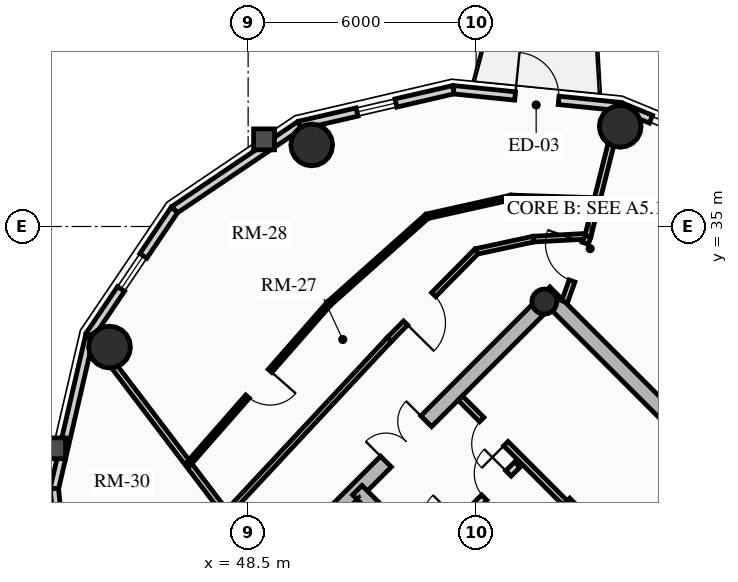
"""IFC4 building model, lengths in metres.
Left out: names, types, materials, properties, quantities, classifications, styles, units other than length and angle.
Written with IfcOpenShell. Run it as: python <this file> out.ifc"""

import sys

from ifc_helpers import new_model, si_unit, direction, frame, frame_2d, origin, origin_2d, place, context, subcontext, project, spatial, rectangle, circle, hollow_circle, extrude, source, transform, mapped, element, fill, save


model = new_model("IFC4")
c1 = context("Model", 3, precision=1e-05, world=origin(), true_north=direction((0.0, 1.0)))
c2 = subcontext(c1, "Body", "Model", "MODEL_VIEW")
j1 = project(units=[si_unit("LENGTHUNIT", "METRE"), si_unit("PLANEANGLEUNIT", "RADIAN")], contexts=[c1])
p1 = place(None, origin())
s1 = spatial("IfcSite", under=j1, at=p1, CompositionType="ELEMENT")
p2 = place(p1, origin())
s2 = spatial("IfcBuilding", under=s1, at=p2, CompositionType="ELEMENT")
p3 = place(p2, frame((0.0, 0.0, 217.03)))
s3 = spatial("IfcBuildingStorey", under=s2, at=p3, CompositionType="ELEMENT", Elevation=217.03)
p4 = place(p3, frame((66.268, 23.298, 0.0), z_axis=(0.0, 0.0, 1.0), x_axis=(-0.707106781187, 0.707106781187, 0.0)))
e1 = element("IfcWall", 1, at=p4, inside=s3, PredefinedType="SHEAR", context=c2, shape_type="SweptSolid", body=[
    extrude(rectangle(XDim=14.1, YDim=0.4, at=frame_2d((7.05, 0.0))), origin(), (0.0, 0.0, 1.0), 2.91),
])
p5 = place(p3, frame((48.873, 25.561, 0.0), z_axis=(0.0, 0.0, 1.0), x_axis=(0.707106781187, 0.707106781187, 0.0)))
e2 = element("IfcWall", 2, at=p5, inside=s3, PredefinedType="SHEAR", context=c2, shape_type="SweptSolid", body=[
    extrude(rectangle(XDim=10.7, YDim=0.4, at=frame_2d((5.35, 0.0))), origin(), (0.0, 0.0, 1.0), 2.91),
])
m1 = source(origin(), c2, "Body", "SweptSolid", [
    extrude(rectangle(XDim=1.5, YDim=2.02, at=frame_2d((0.75, 1.01))), frame((0.0, 0.21, 0.0), z_axis=(0.0, -1.0, 0.0), x_axis=(1.0, 0.0, 0.0)), (0.0, 0.0, 1.0), 0.42),
])
p6 = place(p5, frame((4.6, 0.0, 0.0)))
e3 = element("IfcOpeningElement", 3, at=p6, cuts=e2, PredefinedType="OPENING", context=c2, shape_type="MappedRepresentation", body=[
    mapped(m1, transform((0.0, 0.0, 0.0), x_axis=(1.0, 0.0, 0.0), y_axis=(0.0, 1.0, 0.0), z_axis=(0.0, 0.0, 1.0), scale=1.0)),
])
p7 = place(p3, frame((61.06, 18.373, 0.0), z_axis=(0.0, 0.0, 1.0), x_axis=(-0.707106781187, 0.707106781187, 0.0)))
e4 = element("IfcWall", 4, at=p7, inside=s3, PredefinedType="SHEAR", context=c2, shape_type="SweptSolid", body=[
    extrude(rectangle(XDim=13.7, YDim=0.35, at=frame_2d((6.85, 0.0))), origin(), (0.0, 0.0, 1.0), 2.91),
])
m2 = source(origin(), c2, "Body", "SweptSolid", [
    extrude(rectangle(XDim=1.1, YDim=2.015, at=frame_2d((0.55, 1.007))), frame((0.0, 0.185, 0.0), z_axis=(0.0, -1.0, 0.0), x_axis=(1.0, 0.0, 0.0)), (0.0, 0.0, 1.0), 0.37),
])
p8 = place(p7, frame((4.85, 0.0, 0.0)))
e5 = element("IfcOpeningElement", 5, at=p8, cuts=e4, PredefinedType="OPENING", context=c2, shape_type="MappedRepresentation", body=[
    mapped(m2, transform((0.0, 0.0, 0.0), x_axis=(1.0, 0.0, 0.0), y_axis=(0.0, 1.0, 0.0), z_axis=(0.0, 0.0, 1.0), scale=1.0)),
])
p9 = place(p7, frame((0.625, 0.0, 0.0)))
e6 = element("IfcOpeningElement", 6, at=p9, cuts=e4, PredefinedType="OPENING", context=c2, shape_type="MappedRepresentation", body=[
    mapped(m2, transform((0.0, 0.0, 0.0), x_axis=(1.0, 0.0, 0.0), y_axis=(0.0, 1.0, 0.0), z_axis=(0.0, 0.0, 1.0), scale=1.0)),
])
p10 = place(p7, frame((2.625, 0.0, 0.0)))
e7 = element("IfcOpeningElement", 7, at=p10, cuts=e4, PredefinedType="OPENING", context=c2, shape_type="MappedRepresentation", body=[
    mapped(m2, transform((0.0, 0.0, 0.0), x_axis=(1.0, 0.0, 0.0), y_axis=(0.0, 1.0, 0.0), z_axis=(0.0, 0.0, 1.0), scale=1.0)),
])
m3 = source(origin(), c2, "Body", "SweptSolid", [
    extrude(rectangle(XDim=1.15, YDim=2.02, at=frame_2d((0.575, 1.01))), frame((0.0, 0.185, 0.0), z_axis=(0.0, -1.0, 0.0), x_axis=(1.0, 0.0, 0.0)), (0.0, 0.0, 1.0), 0.37),
])
p11 = place(p7, frame((7.27, 0.0, 0.0)))
e8 = element("IfcOpeningElement", 8, at=p11, cuts=e4, PredefinedType="OPENING", context=c2, shape_type="MappedRepresentation", body=[
    mapped(m3, transform((0.0, 0.0, 0.0), x_axis=(1.0, 0.0, 0.0), y_axis=(0.0, 1.0, 0.0), z_axis=(0.0, 0.0, 1.0), scale=1.0)),
])
p12 = place(p3, frame((63.627, 20.94, 0.0), z_axis=(0.0, 0.0, 1.0), x_axis=(-0.707119496762, 0.707094065383, 0.0)))
e9 = element("IfcWall", 9, at=p12, inside=s3, PredefinedType="SHEAR", context=c2, shape_type="SweptSolid", body=[
    extrude(rectangle(XDim=9.6, YDim=0.35, at=frame_2d((4.8, 0.0))), origin(), (0.0, 0.0, 1.0), 2.91),
])
p13 = place(p12, frame((5.28, 0.0, 0.0)))
e10 = element("IfcOpeningElement", 10, at=p13, cuts=e9, PredefinedType="OPENING", context=c2, shape_type="MappedRepresentation", body=[
    mapped(m3, transform((0.0, 0.0, 0.0), x_axis=(1.0, 0.0, 0.0), y_axis=(0.0, 1.0, 0.0), z_axis=(0.0, 0.0, 1.0), scale=1.0)),
])
p14 = place(p3, frame((58.893, 25.674, 0.0), z_axis=(0.0, 0.0, 1.0), x_axis=(0.707106781187, 0.707106781187, 0.0)))
e11 = element("IfcWall", 11, at=p14, inside=s3, PredefinedType="SHEAR", context=c2, shape_type="SweptSolid", body=[
    extrude(rectangle(XDim=3.285, YDim=0.35, at=frame_2d((1.643, 0.0))), origin(), (0.0, 0.0, 1.0), 2.91),
])
p15 = place(p3, frame((56.294, 33.024, 0.0), z_axis=(0.0, 0.0, 1.0), x_axis=(0.707106781187, 0.707106781187, 0.0)))
e12 = element("IfcColumn", 12, at=p15, inside=s3, PredefinedType="COLUMN", context=c2, shape_type="SweptSolid", body=[
    extrude(hollow_circle(Radius=0.33, WallThickness=0.025, at=origin_2d()), origin(), (0.0, 0.0, 1.0), 2.91),
])
for number, where, z_axis, x_axis in (
    (13, (58.291, 37.635, 0.0), (0.0, 0.0, 1.0), (1.0, 0.0, 0.0)),
    (14, (50.173, 37.146, 0.0), (0.0, 0.0, 1.0), (1.0, 0.0, 0.0)),
    (15, (44.854, 31.827, 0.0), (0.0, 0.0, 1.0), (1.0, 0.0, 0.0)),
):
    element("IfcColumn", number, at=place(p3, frame(where, z_axis=z_axis, x_axis=x_axis)), inside=s3, PredefinedType="USERDEFINED", context=c2, shape_type="SweptSolid", body=[
        extrude(circle(Radius=0.55, at=origin_2d()), origin(), (0.0, 0.0, 1.0), 2.91),
    ])
p16 = place(p3, frame((58.295, 38.155, 0.0), z_axis=(0.0, 0.0, 1.0), x_axis=(0.924515260676, -0.381145028536, 0.0)))
e16 = element("IfcWall", 16, at=p16, inside=s3, PredefinedType="SOLIDWALL", context=c2, shape_type="SweptSolid", body=[
    extrude(rectangle(XDim=0.87, YDim=0.22, at=frame_2d((0.435, 0.0))), origin(), (0.0, 0.0, 1.0), 2.322),
])
p17 = place(p3, frame((53.9, 38.599, 0.0), z_axis=(0.0, 0.0, 1.0), x_axis=(0.994929930991, -0.100570534541, 0.0)))
e17 = element("IfcWall", 17, at=p17, inside=s3, PredefinedType="SOLIDWALL", context=c2, shape_type="SweptSolid", body=[
    extrude(rectangle(XDim=4.418, YDim=0.22, at=frame_2d((2.209, 0.0))), origin(), (0.0, 0.0, 1.0), 2.322),
])
m4 = source(origin(), c2, "Body", "SweptSolid", [
    extrude(rectangle(XDim=1.15, YDim=2.005, at=frame_2d((0.575, 1.002))), frame((0.0, 0.12, 0.0), z_axis=(0.0, -1.0, 0.0), x_axis=(1.0, 0.0, 0.0)), (0.0, 0.0, 1.0), 0.24),
])
p18 = place(p17, frame((1.634, 0.0, 0.0)))
e18 = element("IfcOpeningElement", 18, at=p18, cuts=e17, PredefinedType="OPENING", context=c2, shape_type="MappedRepresentation", body=[
    mapped(m4, transform((0.0, 0.0, 0.0), x_axis=(1.0, 0.0, 0.0), y_axis=(0.0, 1.0, 0.0), z_axis=(0.0, 0.0, 1.0), scale=1.0)),
])
p19 = place(p3, frame((49.856, 37.663, 0.0), z_axis=(0.0, 0.0, 1.0), x_axis=(0.974249228678, 0.225473813158, 0.0)))
e19 = element("IfcWall", 19, at=p19, inside=s3, PredefinedType="SOLIDWALL", context=c2, shape_type="SweptSolid", body=[
    extrude(rectangle(XDim=4.15, YDim=0.22, at=frame_2d((2.075, 0.0))), origin(), (0.0, 0.0, 1.0), 2.322),
])
m5 = source(origin(), c2, "Body", "SweptSolid", [
    extrude(rectangle(XDim=1.05, YDim=1.3, at=frame_2d((0.525, 0.65))), frame((0.0, 0.12, 0.0), z_axis=(0.0, -1.0, 0.0), x_axis=(1.0, 0.0, 0.0)), (0.0, 0.0, 1.0), 0.24),
])
p20 = place(p19, frame((1.55, 0.0, 0.65)))
e20 = element("IfcOpeningElement", 20, at=p20, cuts=e19, PredefinedType="OPENING", context=c2, shape_type="MappedRepresentation", body=[
    mapped(m5, transform((0.0, 0.0, 0.0), x_axis=(1.0, 0.0, 0.0), y_axis=(0.0, 1.0, 0.0), z_axis=(0.0, 0.0, 1.0), scale=1.0)),
])
p21 = place(p3, frame((46.561, 35.439, 0.0), z_axis=(0.0, 0.0, 1.0), x_axis=(0.828833723692, 0.559495003079, 0.0)))
e21 = element("IfcWall", 21, at=p21, inside=s3, PredefinedType="SOLIDWALL", context=c2, shape_type="SweptSolid", body=[
    extrude(rectangle(XDim=3.976, YDim=0.22, at=frame_2d((1.988, 0.0))), origin(), (0.0, 0.0, 1.0), 2.322),
])
p22 = place(p3, frame((44.337, 32.144, 0.0), z_axis=(0.0, 0.0, 1.0), x_axis=(0.559495003079, 0.828833723692, 0.0)))
e22 = element("IfcWall", 22, at=p22, inside=s3, PredefinedType="SOLIDWALL", context=c2, shape_type="SweptSolid", body=[
    extrude(rectangle(XDim=3.976, YDim=0.22, at=frame_2d((1.988, 0.0))), origin(), (0.0, 0.0, 1.0), 2.322),
])
p23 = place(p22, frame((1.463, 0.0, 0.65)))
e23 = element("IfcOpeningElement", 23, at=p23, cuts=e22, PredefinedType="OPENING", context=c2, shape_type="MappedRepresentation", body=[
    mapped(m5, transform((0.0, 0.0, 0.0), x_axis=(1.0, 0.0, 0.0), y_axis=(0.0, 1.0, 0.0), z_axis=(0.0, 0.0, 1.0), scale=1.0)),
])
p24 = place(p3, frame((43.401, 28.1, 0.0), z_axis=(0.0, 0.0, 1.0), x_axis=(0.225473813158, 0.974249228678, 0.0)))
e24 = element("IfcWall", 24, at=p24, inside=s3, PredefinedType="SOLIDWALL", context=c2, shape_type="SweptSolid", body=[
    extrude(rectangle(XDim=4.15, YDim=0.22, at=frame_2d((2.075, 0.0))), origin(), (0.0, 0.0, 1.0), 2.322),
])
p25 = place(p3, frame((43.845, 23.705, 0.0), z_axis=(0.0, 0.0, 1.0), x_axis=(-0.100570534541, 0.994929930991, 0.0)))
e25 = element("IfcWall", 25, at=p25, inside=s3, PredefinedType="SOLIDWALL", context=c2, shape_type="SweptSolid", body=[
    extrude(rectangle(XDim=4.418, YDim=0.22, at=frame_2d((2.209, 0.0))), origin(), (0.0, 0.0, 1.0), 2.322),
])
p26 = place(p25, frame((1.684, 0.0, 0.65)))
e26 = element("IfcOpeningElement", 26, at=p26, cuts=e25, PredefinedType="OPENING", context=c2, shape_type="MappedRepresentation", body=[
    mapped(m5, transform((0.0, 0.0, 0.0), x_axis=(1.0, 0.0, 0.0), y_axis=(0.0, 1.0, 0.0), z_axis=(0.0, 0.0, 1.0), scale=1.0)),
])
p27 = place(p3, frame((53.264, 26.416, 0.0), z_axis=(0.0, 0.0, 1.0), x_axis=(0.707106781187, 0.707106781187, 0.0)))
e27 = element("IfcWall", 27, at=p27, inside=s3, PredefinedType="PARTITIONING", context=c2, shape_type="SweptSolid", body=[
    extrude(rectangle(XDim=3.28, YDim=0.2, at=frame_2d((1.64, 0.0))), origin(), (0.0, 0.0, 1.0), 2.685),
])
m6 = source(origin(), c2, "Body", "SweptSolid", [
    extrude(rectangle(XDim=1.0, YDim=2.015, at=frame_2d((0.5, 1.007))), frame((0.0, 0.11, 0.0), z_axis=(0.0, -1.0, 0.0), x_axis=(1.0, 0.0, 0.0)), (0.0, 0.0, 1.0), 0.22),
])
p28 = place(p27, frame((0.14, 0.0, 0.0)))
e28 = element("IfcOpeningElement", 28, at=p28, cuts=e27, PredefinedType="OPENING", context=c2, shape_type="MappedRepresentation", body=[
    mapped(m6, transform((0.0, 0.0, 0.0), x_axis=(1.0, 0.0, 0.0), y_axis=(0.0, 1.0, 0.0), z_axis=(0.0, 0.0, 1.0), scale=1.0)),
])
m7 = source(origin(), c2, "Body", "SweptSolid", [
    extrude(rectangle(XDim=0.9, YDim=2.005, at=frame_2d((0.45, 1.002))), frame((0.0, 0.11, 0.0), z_axis=(0.0, -1.0, 0.0), x_axis=(1.0, 0.0, 0.0)), (0.0, 0.0, 1.0), 0.22),
])
p29 = place(p27, frame((2.05, 0.0, 0.0)))
e29 = element("IfcOpeningElement", 29, at=p29, cuts=e27, PredefinedType="OPENING", context=c2, shape_type="MappedRepresentation", body=[
    mapped(m7, transform((0.0, 0.0, 0.0), x_axis=(1.0, 0.0, 0.0), y_axis=(0.0, 1.0, 0.0), z_axis=(0.0, 0.0, 1.0), scale=1.0)),
])
p30 = place(p3, frame((56.839, 27.728, 0.0), z_axis=(0.0, 0.0, 1.0), x_axis=(-0.707106781187, 0.707106781187, 0.0)))
e30 = element("IfcWall", 30, at=p30, inside=s3, PredefinedType="PARTITIONING", context=c2, shape_type="SweptSolid", body=[
    extrude(rectangle(XDim=3.9, YDim=0.16, at=frame_2d((1.95, 0.0))), origin(), (0.0, 0.0, 1.0), 2.685),
])
m8 = source(origin(), c2, "Body", "SweptSolid", [
    extrude(rectangle(XDim=0.9, YDim=2.005, at=frame_2d((0.45, 1.002))), frame((0.0, 0.09, 0.0), z_axis=(0.0, -1.0, 0.0), x_axis=(1.0, 0.0, 0.0)), (0.0, 0.0, 1.0), 0.18),
])
p31 = place(p30, frame((2.2, 0.0, 0.0)))
e31 = element("IfcOpeningElement", 31, at=p31, cuts=e30, PredefinedType="OPENING", context=c2, shape_type="MappedRepresentation", body=[
    mapped(m8, transform((0.0, 0.0, 0.0), x_axis=(1.0, 0.0, 0.0), y_axis=(0.0, 1.0, 0.0), z_axis=(0.0, 0.0, 1.0), scale=1.0)),
])
p32 = place(p3, frame((57.44, 34.744, 0.0), z_axis=(0.0, 0.0, 1.0), x_axis=(-0.998578025565, -0.053309725738, 0.0)))
e32 = element("IfcWall", 32, at=p32, inside=s3, PredefinedType="PARTITIONING", context=c2, shape_type="SweptSolid", body=[
    extrude(rectangle(XDim=1.433, YDim=0.15, at=frame_2d((0.717, 0.0))), origin(), (0.0, 0.0, 1.0), 2.322),
])
p33 = place(p3, frame((56.009, 34.667, 0.0), z_axis=(0.0, 0.0, 1.0), x_axis=(-0.977625498152, -0.210353001795, 0.0)))
e33 = element("IfcWall", 33, at=p33, inside=s3, PredefinedType="PARTITIONING", context=c2, shape_type="SweptSolid", body=[
    extrude(rectangle(XDim=1.538, YDim=0.15, at=frame_2d((0.769, 0.0))), origin(), (0.0, 0.0, 1.0), 2.255),
])
p34 = place(p3, frame((54.506, 34.344, 0.0), z_axis=(0.0, 0.0, 1.0), x_axis=(-0.703053402247, -0.711137056824, 0.0)))
e34 = element("IfcWall", 34, at=p34, inside=s3, PredefinedType="PARTITIONING", context=c2, shape_type="SweptSolid", body=[
    extrude(rectangle(XDim=3.262, YDim=0.15, at=frame_2d((1.631, 0.0))), origin(), (0.0, 0.0, 1.0), 2.322),
])
m9 = source(origin(), c2, "Body", "SweptSolid", [
    extrude(rectangle(XDim=1.05, YDim=2.015, at=frame_2d((0.525, 1.007))), frame((0.0, 0.085, 0.0), z_axis=(0.0, -1.0, 0.0), x_axis=(1.0, 0.0, 0.0)), (0.0, 0.0, 1.0), 0.17),
])
p35 = place(p34, frame((1.599, 0.0, 0.0)))
e35 = element("IfcOpeningElement", 35, at=p35, cuts=e34, PredefinedType="OPENING", context=c2, shape_type="MappedRepresentation", body=[
    mapped(m9, transform((0.0, 0.0, 0.0), x_axis=(1.0, 0.0, 0.0), y_axis=(0.0, 1.0, 0.0), z_axis=(0.0, 0.0, 1.0), scale=1.0)),
])
p36 = place(p3, frame((52.212, 32.024, 0.0), z_axis=(0.0, 0.0, 1.0), x_axis=(-0.682158998173, -0.731203871169, 0.0)))
e36 = element("IfcWall", 36, at=p36, inside=s3, PredefinedType="PARTITIONING", context=c2, shape_type="SweptSolid", body=[
    extrude(rectangle(XDim=6.282, YDim=0.15, at=frame_2d((3.141, 0.0))), origin(), (0.0, 0.0, 1.0), 2.255),
])
p37 = place(p3, frame((57.44, 34.744, 0.0), z_axis=(0.0, 0.0, 1.0), x_axis=(0.243619816457, 0.969870808422, 0.0)))
e37 = element("IfcWall", 37, at=p37, inside=s3, PredefinedType="PARTITIONING", context=c2, shape_type="SweptSolid", body=[
    extrude(rectangle(XDim=3.496, YDim=0.16, at=frame_2d((1.748, 0.0))), origin(), (0.0, 0.0, 1.0), 2.322),
])
p38 = place(p3, frame((47.927, 27.431, 0.0), z_axis=(0.0, 0.0, 1.0), x_axis=(-0.604823333103, 0.796359677366, 0.0)))
e38 = element("IfcWall", 38, at=p38, inside=s3, PredefinedType="PARTITIONING", context=c2, shape_type="SweptSolid", body=[
    extrude(rectangle(XDim=5.907, YDim=0.16, at=frame_2d((2.953, 0.0))), origin(), (0.0, 0.0, 1.0), 2.322),
])
p39 = place(p3, frame((56.828, 33.021, 0.0), z_axis=(0.0, 0.0, 1.0), x_axis=(0.334788446034, 0.942293317605, 0.0)))
e39 = element("IfcWall", 39, at=p39, inside=s3, PredefinedType="PARTITIONING", context=c2, shape_type="SweptSolid", body=[
    extrude(rectangle(XDim=1.829, YDim=0.16, at=frame_2d((0.915, 0.0))), origin(), (0.0, 0.0, 1.0), 2.255),
])
m10 = source(origin(), c2, "Body", "SweptSolid", [
    extrude(rectangle(XDim=1.05, YDim=2.015, at=frame_2d((0.525, 1.007))), frame((0.0, 0.09, 0.0), z_axis=(0.0, -1.0, 0.0), x_axis=(1.0, 0.0, 0.0)), (0.0, 0.0, 1.0), 0.18),
])
p40 = place(p39, frame((0.579, 0.0, 0.0)))
e40 = element("IfcOpeningElement", 40, at=p40, cuts=e39, PredefinedType="OPENING", context=c2, shape_type="MappedRepresentation", body=[
    mapped(m10, transform((0.0, 0.0, 0.0), x_axis=(1.0, 0.0, 0.0), y_axis=(0.0, 1.0, 0.0), z_axis=(0.0, 0.0, 1.0), scale=1.0)),
])
p41 = place(p3, frame((57.679, 35.693, 0.0), z_axis=(0.0, 0.0, 1.0), x_axis=(-0.999526298938, 0.030776252722, 0.0)))
e41 = element("IfcWall", 41, at=p41, inside=s3, PredefinedType="PARTITIONING", context=c2, shape_type="SweptSolid", body=[
    extrude(rectangle(XDim=2.261, YDim=0.125, at=frame_2d((1.13, 0.0))), origin(), (0.0, 0.0, 1.0), 2.322),
])
p42 = place(p3, frame((55.419, 35.763, 0.0), z_axis=(0.0, 0.0, 1.0), x_axis=(-0.975917771425, -0.218138725166, 0.0)))
e42 = element("IfcWall", 42, at=p42, inside=s3, PredefinedType="PARTITIONING", context=c2, shape_type="SweptSolid", body=[
    extrude(rectangle(XDim=2.268, YDim=0.125, at=frame_2d((1.134, 0.0))), origin(), (0.0, 0.0, 1.0), 2.255),
])
p43 = place(p3, frame((53.206, 35.268, 0.0), z_axis=(0.0, 0.0, 1.0), x_axis=(-0.746677760999, -0.665185929819, 0.0)))
e43 = element("IfcWall", 43, at=p43, inside=s3, PredefinedType="PARTITIONING", context=c2, shape_type="SweptSolid", body=[
    extrude(rectangle(XDim=3.445, YDim=0.125, at=frame_2d((1.723, 0.0))), origin(), (0.0, 0.0, 1.0), 2.322),
])
p44 = place(p3, frame((50.634, 32.977, 0.0), z_axis=(0.0, 0.0, 1.0), x_axis=(-0.659241945747, -0.751930885765, 0.0)))
e44 = element("IfcWall", 44, at=p44, inside=s3, PredefinedType="PARTITIONING", context=c2, shape_type="SweptSolid", body=[
    extrude(rectangle(XDim=5.624, YDim=0.125, at=frame_2d((2.812, 0.0))), origin(), (0.0, 0.0, 1.0), 2.255),
])
m11 = source(origin(), c2, "Body", "SweptSolid", [
    extrude(rectangle(XDim=0.9, YDim=2.005, at=frame_2d((0.45, 1.002))), frame((0.0, 0.073, 0.0), z_axis=(0.0, -1.0, 0.0), x_axis=(1.0, 0.0, 0.0)), (0.0, 0.0, 1.0), 0.145),
])
p45 = place(p44, frame((2.362, 0.0, 0.0)))
e45 = element("IfcOpeningElement", 45, at=p45, cuts=e44, PredefinedType="OPENING", context=c2, shape_type="MappedRepresentation", body=[
    mapped(m11, transform((0.0, 0.0, 0.0), x_axis=(1.0, 0.0, 0.0), y_axis=(0.0, 1.0, 0.0), z_axis=(0.0, 0.0, 1.0), scale=1.0)),
])
m12 = source(origin(), c2, "Body", "SweptSolid", [
    extrude(rectangle(XDim=1.15, YDim=2.005, at=frame_2d((0.575, 1.002))), frame((0.0, 0.025, 0.0), z_axis=(0.0, -1.0, 0.0), x_axis=(1.0, 0.0, 0.0)), (0.0, 0.0, 1.0), 0.05),
])
p46 = place(p18, origin())
e46 = element("IfcDoor", 46, at=p46, inside=s3, OperationType="SINGLE_SWING_LEFT", PredefinedType="DOOR", context=c2, shape_type="MappedRepresentation", body=[
    mapped(m12, transform((0.0, 0.0, 0.0), x_axis=(1.0, 0.0, 0.0), y_axis=(0.0, 1.0, 0.0), z_axis=(0.0, 0.0, 1.0), scale=1.0)),
])
fill(e18, e46)
m13 = source(origin(), c2, "Body", "SweptSolid", [
    extrude(rectangle(XDim=1.05, YDim=1.3, at=frame_2d((0.525, 0.65))), frame((0.0, 0.03, 0.0), z_axis=(0.0, -1.0, 0.0), x_axis=(1.0, 0.0, 0.0)), (0.0, 0.0, 1.0), 0.06),
])
p47 = place(p20, origin())
e47 = element("IfcWindow", 47, at=p47, inside=s3, PartitioningType="SINGLE_PANEL", PredefinedType="WINDOW", context=c2, shape_type="MappedRepresentation", body=[
    mapped(m13, transform((0.0, 0.0, 0.0), x_axis=(1.0, 0.0, 0.0), y_axis=(0.0, 1.0, 0.0), z_axis=(0.0, 0.0, 1.0), scale=1.0)),
])
fill(e20, e47)
p48 = place(p23, origin())
e48 = element("IfcWindow", 48, at=p48, inside=s3, PartitioningType="SINGLE_PANEL", PredefinedType="WINDOW", context=c2, shape_type="MappedRepresentation", body=[
    mapped(m13, transform((0.0, 0.0, 0.0), x_axis=(1.0, 0.0, 0.0), y_axis=(0.0, 1.0, 0.0), z_axis=(0.0, 0.0, 1.0), scale=1.0)),
])
fill(e23, e48)
m14 = source(origin(), c2, "Body", "SweptSolid", [
    extrude(rectangle(XDim=1.5, YDim=2.02, at=frame_2d((0.75, 1.01))), frame((0.0, 0.025, 0.0), z_axis=(0.0, -1.0, 0.0), x_axis=(1.0, 0.0, 0.0)), (0.0, 0.0, 1.0), 0.05),
])
p49 = place(p6, origin())
e49 = element("IfcDoor", 49, at=p49, inside=s3, OperationType="DOUBLE_DOOR_SINGLE_SWING", PredefinedType="DOOR", context=c2, shape_type="MappedRepresentation", body=[
    mapped(m14, transform((0.0, 0.0, 0.0), x_axis=(1.0, 0.0, 0.0), y_axis=(0.0, 1.0, 0.0), z_axis=(0.0, 0.0, 1.0), scale=1.0)),
])
fill(e3, e49)
m15 = source(origin(), c2, "Body", "SweptSolid", [
    extrude(rectangle(XDim=0.9, YDim=2.005, at=frame_2d((0.45, 1.002))), frame((0.0, 0.025, 0.0), z_axis=(0.0, -1.0, 0.0), x_axis=(1.0, 0.0, 0.0)), (0.0, 0.0, 1.0), 0.05),
])
p50 = place(p29, origin())
e50 = element("IfcDoor", 50, at=p50, inside=s3, OperationType="SINGLE_SWING_RIGHT", PredefinedType="DOOR", context=c2, shape_type="MappedRepresentation", body=[
    mapped(m15, transform((0.0, 0.0, 0.0), x_axis=(1.0, 0.0, 0.0), y_axis=(0.0, 1.0, 0.0), z_axis=(0.0, 0.0, 1.0), scale=1.0)),
])
fill(e29, e50)
p51 = place(p31, origin())
e51 = element("IfcDoor", 51, at=p51, inside=s3, OperationType="SINGLE_SWING_LEFT", PredefinedType="DOOR", context=c2, shape_type="MappedRepresentation", body=[
    mapped(m15, transform((0.0, 0.0, 0.0), x_axis=(1.0, 0.0, 0.0), y_axis=(0.0, 1.0, 0.0), z_axis=(0.0, 0.0, 1.0), scale=1.0)),
])
fill(e31, e51)
m16 = source(origin(), c2, "Body", "SweptSolid", [
    extrude(rectangle(XDim=1.05, YDim=2.015, at=frame_2d((0.525, 1.007))), frame((0.0, 0.025, 0.0), z_axis=(0.0, -1.0, 0.0), x_axis=(1.0, 0.0, 0.0)), (0.0, 0.0, 1.0), 0.05),
])
p52 = place(p40, origin())
e52 = element("IfcDoor", 52, at=p52, inside=s3, OperationType="SINGLE_SWING_RIGHT", PredefinedType="DOOR", context=c2, shape_type="MappedRepresentation", body=[
    mapped(m16, transform((0.0, 0.0, 0.0), x_axis=(1.0, 0.0, 0.0), y_axis=(0.0, 1.0, 0.0), z_axis=(0.0, 0.0, 1.0), scale=1.0)),
])
fill(e40, e52)
p53 = place(p35, origin())
e53 = element("IfcDoor", 53, at=p53, inside=s3, OperationType="SINGLE_SWING_RIGHT", PredefinedType="DOOR", context=c2, shape_type="MappedRepresentation", body=[
    mapped(m16, transform((0.0, 0.0, 0.0), x_axis=(1.0, 0.0, 0.0), y_axis=(0.0, 1.0, 0.0), z_axis=(0.0, 0.0, 1.0), scale=1.0)),
])
fill(e35, e53)
p54 = place(p45, origin())
e54 = element("IfcDoor", 54, at=p54, inside=s3, OperationType="SINGLE_SWING_LEFT", PredefinedType="DOOR", context=c2, shape_type="MappedRepresentation", body=[
    mapped(m15, transform((0.0, 0.0, 0.0), x_axis=(1.0, 0.0, 0.0), y_axis=(0.0, 1.0, 0.0), z_axis=(0.0, 0.0, 1.0), scale=1.0)),
])
fill(e45, e54)
save(model, sys.argv[1])
